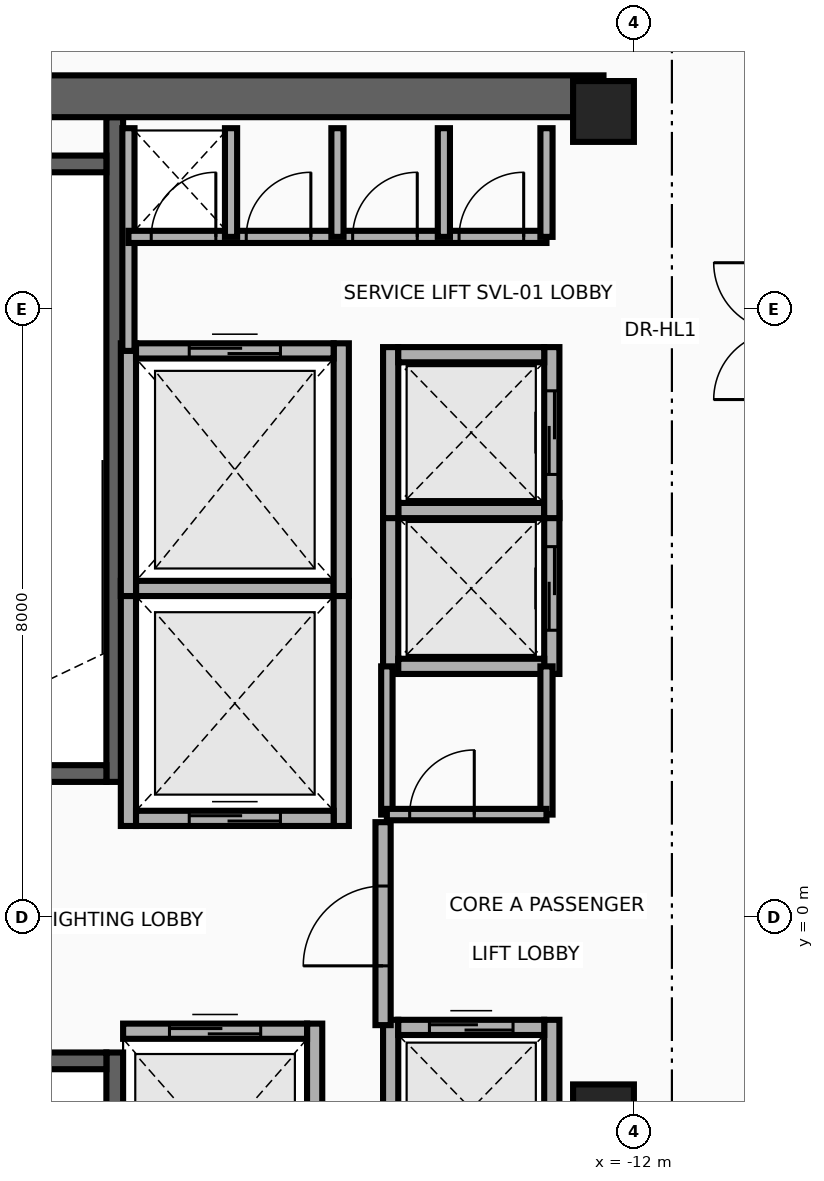
"""IFC4 building model, lengths in metres.
Left out: names, types, materials, properties, quantities, classifications, styles, units other than length and angle.
Written with IfcOpenShell. Run it as: python <this file> out.ifc"""

import sys

from ifc_helpers import new_model, si_unit, direction, frame, frame_2d, origin, origin_2d, place, context, subcontext, project, spatial, rectangle, extrude, source, transform, mapped, element, fill, save


model = new_model("IFC4")
c1 = context("Model", 3, precision=1e-05, world=origin(), true_north=direction((0.0, 1.0)))
c2 = subcontext(c1, "Body", "Model", "MODEL_VIEW")
j1 = project(units=[si_unit("LENGTHUNIT", "METRE"), si_unit("PLANEANGLEUNIT", "RADIAN")], contexts=[c1])
p1 = place(None, origin())
s1 = spatial("IfcSite", under=j1, at=p1, CompositionType="ELEMENT")
p2 = place(p1, origin())
s2 = spatial("IfcBuilding", under=s1, at=p2, CompositionType="ELEMENT")
p3 = place(p2, frame((0.0, 0.0, 273.0)))
s3 = spatial("IfcBuildingStorey", under=s2, at=p3, CompositionType="ELEMENT", Elevation=273.0)
p4 = place(p3, frame((-18.83, 1.78, 0.0), z_axis=(0.0, 0.0, 1.0), x_axis=(0.0, 1.0, 0.0)))
e1 = element("IfcWall", 1, at=p4, inside=s3, PredefinedType="SHEAR", context=c2, shape_type="SweptSolid", body=[
    extrude(rectangle(XDim=8.745, YDim=0.22, at=frame_2d((4.373, 0.0))), origin(), (0.0, 0.0, 1.0), 3.26),
])
p5 = place(p3, frame((-22.05, 1.89, 0.0), z_axis=(0.0, 0.0, 1.0), x_axis=(1.0, 0.0, 0.0)))
e2 = element("IfcWall", 2, at=p5, inside=s3, PredefinedType="SHEAR", context=c2, shape_type="SweptSolid", body=[
    extrude(rectangle(XDim=3.11, YDim=0.22, at=frame_2d((1.555, 0.0))), origin(), (0.0, 0.0, 1.0), 3.26),
])
p6 = place(p5, frame((1.0, 0.0, 0.0)))
e3 = element("IfcOpeningElement", 3, at=p6, cuts=e2, PredefinedType="OPENING", context=c2, shape_type="SweptSolid", body=[
    extrude(rectangle(XDim=1.1, YDim=2.15, at=frame_2d((0.55, 1.075))), frame((0.0, 0.125, 0.0), z_axis=(0.0, -1.0, 0.0), x_axis=(1.0, 0.0, 0.0)), (0.0, 0.0, 1.0), 0.25),
])
p7 = place(p3, frame((-22.05, 9.91, 0.0), z_axis=(0.0, 0.0, 1.0), x_axis=(1.0, 0.0, 0.0)))
e4 = element("IfcWall", 4, at=p7, inside=s3, PredefinedType="SHEAR", context=c2, shape_type="SweptSolid", body=[
    extrude(rectangle(XDim=3.11, YDim=0.22, at=frame_2d((1.555, 0.0))), origin(), (0.0, 0.0, 1.0), 3.26),
])
p8 = place(p3, frame((-18.83, -10.525, 0.0), z_axis=(0.0, 0.0, 1.0), x_axis=(0.0, 1.0, 0.0)))
e5 = element("IfcWall", 5, at=p8, inside=s3, PredefinedType="SHEAR", context=c2, shape_type="SweptSolid", body=[
    extrude(rectangle(XDim=8.745, YDim=0.22, at=frame_2d((4.373, 0.0))), origin(), (0.0, 0.0, 1.0), 3.26),
])
p9 = place(p3, frame((-22.05, -1.89, 0.0), z_axis=(0.0, 0.0, 1.0), x_axis=(1.0, 0.0, 0.0)))
e6 = element("IfcWall", 6, at=p9, inside=s3, PredefinedType="SHEAR", context=c2, shape_type="SweptSolid", body=[
    extrude(rectangle(XDim=3.11, YDim=0.22, at=frame_2d((1.555, 0.0))), origin(), (0.0, 0.0, 1.0), 3.26),
])
p10 = place(p9, frame((1.0, 0.0, 0.0)))
e7 = element("IfcOpeningElement", 7, at=p10, cuts=e6, PredefinedType="OPENING", context=c2, shape_type="SweptSolid", body=[
    extrude(rectangle(XDim=1.1, YDim=2.15, at=frame_2d((0.55, 1.075))), frame((0.0, 0.125, 0.0), z_axis=(0.0, -1.0, 0.0), x_axis=(1.0, 0.0, 0.0)), (0.0, 0.0, 1.0), 0.25),
])
p11 = place(p3, frame((-22.65, 10.8, 0.0), z_axis=(0.0, 0.0, 1.0), x_axis=(1.0, 0.0, 0.0)))
e8 = element("IfcWall", 8, at=p11, inside=s3, PredefinedType="SHEAR", context=c2, shape_type="SweptSolid", body=[
    extrude(rectangle(XDim=10.25, YDim=0.55, at=frame_2d((5.125, 0.0))), origin(), (0.0, 0.0, 1.0), 3.26),
])
m1 = source(origin(), c2, "Body", "SweptSolid", [
    extrude(rectangle(XDim=0.8, YDim=0.8, at=origin_2d()), origin(), (0.0, 0.0, 1.0), 3.5),
])
for number, where, z_axis, x_axis in (
    (9, (-12.4, -2.6, 0.0), (0.0, 0.0, 1.0), (1.0, 0.0, 0.0)),
    (10, (-12.4, 10.6, 0.0), (0.0, 0.0, 1.0), (1.0, 0.0, 0.0)),
):
    element("IfcColumn", number, at=place(p3, frame(where, z_axis=z_axis, x_axis=x_axis)), inside=s3, PredefinedType="COLUMN", context=c2, shape_type="MappedRepresentation", body=[
        mapped(m1, transform((0.0, 0.0, 0.0), x_axis=(1.0, 0.0, 0.0), y_axis=(0.0, 1.0, 0.0), z_axis=(0.0, 0.0, 1.0), scale=1.0)),
    ])
for number, where, z_axis, x_axis in (
    (11, (-18.65, 1.2, 0.0), (0.0, 0.0, 1.0), (0.0, 1.0, 0.0)),
    (12, (-15.85, 1.2, 0.0), (0.0, 0.0, 1.0), (0.0, 1.0, 0.0)),
):
    element("IfcWall", number, at=place(p3, frame(where, z_axis=z_axis, x_axis=x_axis)), inside=s3, PredefinedType="MOVABLE", context=c2, shape_type="SweptSolid", body=[
        extrude(rectangle(XDim=3.225, YDim=0.2, at=frame_2d((1.613, 0.0))), origin(), (0.0, 0.0, 1.0), 3.26),
    ])
p12 = place(p3, frame((-18.55, 1.3, 0.0), z_axis=(0.0, 0.0, 1.0), x_axis=(1.0, 0.0, 0.0)))
e13 = element("IfcWall", 13, at=p12, inside=s3, PredefinedType="MOVABLE", context=c2, shape_type="SweptSolid", body=[
    extrude(rectangle(XDim=2.6, YDim=0.2, at=frame_2d((1.3, 0.0))), origin(), (0.0, 0.0, 1.0), 3.26),
])
p13 = place(p12, frame((0.7, 0.0, 0.0)))
e14 = element("IfcOpeningElement", 14, at=p13, cuts=e13, PredefinedType="OPENING", context=c2, shape_type="SweptSolid", body=[
    extrude(rectangle(XDim=1.2, YDim=2.1, at=frame_2d((0.6, 1.05))), frame((0.0, 0.115, 0.0), z_axis=(0.0, -1.0, 0.0), x_axis=(1.0, 0.0, 0.0)), (0.0, 0.0, 1.0), 0.23),
])
p14 = place(p3, frame((-18.55, 4.325, 0.0), z_axis=(0.0, 0.0, 1.0), x_axis=(1.0, 0.0, 0.0)))
e15 = element("IfcWall", 15, at=p14, inside=s3, PredefinedType="MOVABLE", context=c2, shape_type="SweptSolid", body=[
    extrude(rectangle(XDim=2.6, YDim=0.2, at=frame_2d((1.3, 0.0))), origin(), (0.0, 0.0, 1.0), 3.26),
])
p15 = place(p3, frame((-16.2, -4.6, 0.0), z_axis=(0.0, 0.0, 1.0), x_axis=(0.0, 1.0, 0.0)))
e16 = element("IfcWall", 16, at=p15, inside=s3, PredefinedType="MOVABLE", context=c2, shape_type="SweptSolid", body=[
    extrude(rectangle(XDim=3.2, YDim=0.2, at=frame_2d((1.6, 0.0))), origin(), (0.0, 0.0, 1.0), 3.26),
])
p16 = place(p3, frame((-18.72, -1.5, 0.0), z_axis=(0.0, 0.0, 1.0), x_axis=(1.0, 0.0, 0.0)))
e17 = element("IfcWall", 17, at=p16, inside=s3, PredefinedType="MOVABLE", context=c2, shape_type="SweptSolid", body=[
    extrude(rectangle(XDim=2.42, YDim=0.2, at=frame_2d((1.21, 0.0))), origin(), (0.0, 0.0, 1.0), 3.26),
])
p17 = place(p16, frame((0.61, 0.0, 0.0)))
e18 = element("IfcOpeningElement", 18, at=p17, cuts=e17, PredefinedType="OPENING", context=c2, shape_type="SweptSolid", body=[
    extrude(rectangle(XDim=1.2, YDim=2.1, at=frame_2d((0.6, 1.05))), frame((0.0, 0.115, 0.0), z_axis=(0.0, -1.0, 0.0), x_axis=(1.0, 0.0, 0.0)), (0.0, 0.0, 1.0), 0.23),
])
for number, where, z_axis, x_axis in (
    (19, (-18.65, 4.225, 0.0), (0.0, 0.0, 1.0), (0.0, 1.0, 0.0)),
    (20, (-15.85, 4.225, 0.0), (0.0, 0.0, 1.0), (0.0, 1.0, 0.0)),
):
    element("IfcWall", number, at=place(p3, frame(where, z_axis=z_axis, x_axis=x_axis)), inside=s3, PredefinedType="MOVABLE", context=c2, shape_type="SweptSolid", body=[
        extrude(rectangle(XDim=3.325, YDim=0.2, at=frame_2d((1.663, 0.0))), origin(), (0.0, 0.0, 1.0), 3.26),
    ])
p18 = place(p3, frame((-18.55, 7.45, 0.0), z_axis=(0.0, 0.0, 1.0), x_axis=(1.0, 0.0, 0.0)))
e21 = element("IfcWall", 21, at=p18, inside=s3, PredefinedType="MOVABLE", context=c2, shape_type="SweptSolid", body=[
    extrude(rectangle(XDim=2.6, YDim=0.2, at=frame_2d((1.3, 0.0))), origin(), (0.0, 0.0, 1.0), 3.26),
])
p19 = place(p18, frame((0.7, 0.0, 0.0)))
e22 = element("IfcOpeningElement", 22, at=p19, cuts=e21, PredefinedType="OPENING", context=c2, shape_type="SweptSolid", body=[
    extrude(rectangle(XDim=1.2, YDim=2.1, at=frame_2d((0.6, 1.05))), frame((0.0, 0.115, 0.0), z_axis=(0.0, -1.0, 0.0), x_axis=(1.0, 0.0, 0.0)), (0.0, 0.0, 1.0), 0.23),
])
p20 = place(p3, frame((-15.2, 3.2, 0.0), z_axis=(0.0, 0.0, 1.0), x_axis=(0.0, 1.0, 0.0)))
e23 = element("IfcWall", 23, at=p20, inside=s3, PredefinedType="MOVABLE", context=c2, shape_type="SweptSolid", body=[
    extrude(rectangle(XDim=2.25, YDim=0.2, at=frame_2d((1.125, 0.0))), origin(), (0.0, 0.0, 1.0), 3.26),
])
p21 = place(p3, frame((-13.08, 3.2, 0.0), z_axis=(0.0, 0.0, 1.0), x_axis=(0.0, 1.0, 0.0)))
e24 = element("IfcWall", 24, at=p21, inside=s3, PredefinedType="MOVABLE", context=c2, shape_type="SweptSolid", body=[
    extrude(rectangle(XDim=2.25, YDim=0.2, at=frame_2d((1.125, 0.0))), origin(), (0.0, 0.0, 1.0), 3.26),
])
p22 = place(p21, frame((0.575, 0.0, 0.0)))
e25 = element("IfcOpeningElement", 25, at=p22, cuts=e24, PredefinedType="OPENING", context=c2, shape_type="SweptSolid", body=[
    extrude(rectangle(XDim=1.1, YDim=2.1, at=frame_2d((0.55, 1.05))), frame((0.0, 0.115, 0.0), z_axis=(0.0, -1.0, 0.0), x_axis=(1.0, 0.0, 0.0)), (0.0, 0.0, 1.0), 0.23),
])
for number, where, z_axis, x_axis in (
    (26, (-15.1, 3.3, 0.0), (0.0, 0.0, 1.0), (1.0, 0.0, 0.0)),
    (27, (-15.1, 5.35, 0.0), (0.0, 0.0, 1.0), (1.0, 0.0, 0.0)),
):
    element("IfcWall", number, at=place(p3, frame(where, z_axis=z_axis, x_axis=x_axis)), inside=s3, PredefinedType="MOVABLE", context=c2, shape_type="SweptSolid", body=[
        extrude(rectangle(XDim=1.92, YDim=0.2, at=frame_2d((0.96, 0.0))), origin(), (0.0, 0.0, 1.0), 3.26),
    ])
p23 = place(p3, frame((-15.2, 5.25, 0.0), z_axis=(0.0, 0.0, 1.0), x_axis=(0.0, 1.0, 0.0)))
e28 = element("IfcWall", 28, at=p23, inside=s3, PredefinedType="MOVABLE", context=c2, shape_type="SweptSolid", body=[
    extrude(rectangle(XDim=2.25, YDim=0.2, at=frame_2d((1.125, 0.0))), origin(), (0.0, 0.0, 1.0), 3.26),
])
p24 = place(p3, frame((-13.08, 5.25, 0.0), z_axis=(0.0, 0.0, 1.0), x_axis=(0.0, 1.0, 0.0)))
e29 = element("IfcWall", 29, at=p24, inside=s3, PredefinedType="MOVABLE", context=c2, shape_type="SweptSolid", body=[
    extrude(rectangle(XDim=2.25, YDim=0.2, at=frame_2d((1.125, 0.0))), origin(), (0.0, 0.0, 1.0), 3.26),
])
p25 = place(p24, frame((0.575, 0.0, 0.0)))
e30 = element("IfcOpeningElement", 30, at=p25, cuts=e29, PredefinedType="OPENING", context=c2, shape_type="SweptSolid", body=[
    extrude(rectangle(XDim=1.1, YDim=2.1, at=frame_2d((0.55, 1.05))), frame((0.0, 0.115, 0.0), z_axis=(0.0, -1.0, 0.0), x_axis=(1.0, 0.0, 0.0)), (0.0, 0.0, 1.0), 0.23),
])
p26 = place(p3, frame((-15.1, 7.4, 0.0), z_axis=(0.0, 0.0, 1.0), x_axis=(1.0, 0.0, 0.0)))
e31 = element("IfcWall", 31, at=p26, inside=s3, PredefinedType="MOVABLE", context=c2, shape_type="SweptSolid", body=[
    extrude(rectangle(XDim=1.92, YDim=0.2, at=frame_2d((0.96, 0.0))), origin(), (0.0, 0.0, 1.0), 3.26),
])
for number, where, z_axis, x_axis in (
    (32, (-15.2, -3.7, 0.0), (0.0, 0.0, 1.0), (0.0, 1.0, 0.0)),
    (33, (-13.08, -3.7, 0.0), (0.0, 0.0, 1.0), (0.0, 1.0, 0.0)),
):
    element("IfcWall", number, at=place(p3, frame(where, z_axis=z_axis, x_axis=x_axis)), inside=s3, PredefinedType="MOVABLE", context=c2, shape_type="SweptSolid", body=[
        extrude(rectangle(XDim=2.35, YDim=0.2, at=frame_2d((1.175, 0.0))), origin(), (0.0, 0.0, 1.0), 3.26),
    ])
p27 = place(p3, frame((-15.1, -1.45, 0.0), z_axis=(0.0, 0.0, 1.0), x_axis=(1.0, 0.0, 0.0)))
e34 = element("IfcWall", 34, at=p27, inside=s3, PredefinedType="MOVABLE", context=c2, shape_type="SweptSolid", body=[
    extrude(rectangle(XDim=1.92, YDim=0.2, at=frame_2d((0.96, 0.0))), origin(), (0.0, 0.0, 1.0), 3.26),
])
p28 = place(p27, frame((0.41, 0.0, 0.0)))
e35 = element("IfcOpeningElement", 35, at=p28, cuts=e34, PredefinedType="OPENING", context=c2, shape_type="SweptSolid", body=[
    extrude(rectangle(XDim=1.1, YDim=2.1, at=frame_2d((0.55, 1.05))), frame((0.0, 0.115, 0.0), z_axis=(0.0, -1.0, 0.0), x_axis=(1.0, 0.0, 0.0)), (0.0, 0.0, 1.0), 0.23),
])
p29 = place(p3, frame((-15.3, -1.42, 0.0), z_axis=(0.0, 0.0, 1.0), x_axis=(0.0, 1.0, 0.0)))
e36 = element("IfcWall", 36, at=p29, inside=s3, PredefinedType="PARTITIONING", context=c2, shape_type="SweptSolid", body=[
    extrude(rectangle(XDim=2.67, YDim=0.2, at=frame_2d((1.335, 0.0))), origin(), (0.0, 0.0, 1.0), 3.26),
])
p30 = place(p29, frame((0.78, 0.0, 0.0)))
e37 = element("IfcOpeningElement", 37, at=p30, cuts=e36, PredefinedType="OPENING", context=c2, shape_type="SweptSolid", body=[
    extrude(rectangle(XDim=1.05, YDim=2.15, at=frame_2d((0.525, 1.075))), frame((0.0, 0.115, 0.0), z_axis=(0.0, -1.0, 0.0), x_axis=(1.0, 0.0, 0.0)), (0.0, 0.0, 1.0), 0.23),
])
p31 = place(p3, frame((-18.65, 7.45, 0.0), z_axis=(0.0, 0.0, 1.0), x_axis=(0.0, 1.0, 0.0)))
e38 = element("IfcWall", 38, at=p31, inside=s3, PredefinedType="PARTITIONING", context=c2, shape_type="SweptSolid", body=[
    extrude(rectangle(XDim=2.93, YDim=0.16, at=frame_2d((1.465, 0.0))), origin(), (0.0, 0.0, 1.0), 3.26),
])
p32 = place(p3, frame((-18.65, 8.95, 0.0), z_axis=(0.0, 0.0, 1.0), x_axis=(1.0, 0.0, 0.0)))
e39 = element("IfcWall", 39, at=p32, inside=s3, PredefinedType="PARTITIONING", context=c2, shape_type="SweptSolid", body=[
    extrude(rectangle(XDim=5.5, YDim=0.16, at=frame_2d((2.75, 0.0))), origin(), (0.0, 0.0, 1.0), 3.26),
])
p33 = place(p32, frame((0.3, 0.0, 0.0)))
e40 = element("IfcOpeningElement", 40, at=p33, cuts=e39, PredefinedType="OPENING", context=c2, shape_type="SweptSolid", body=[
    extrude(rectangle(XDim=0.85, YDim=2.05, at=frame_2d((0.425, 1.025))), frame((0.0, 0.095, 0.0), z_axis=(0.0, -1.0, 0.0), x_axis=(1.0, 0.0, 0.0)), (0.0, 0.0, 1.0), 0.19),
])
p34 = place(p32, frame((1.55, 0.0, 0.0)))
e41 = element("IfcOpeningElement", 41, at=p34, cuts=e39, PredefinedType="OPENING", context=c2, shape_type="SweptSolid", body=[
    extrude(rectangle(XDim=0.85, YDim=2.05, at=frame_2d((0.425, 1.025))), frame((0.0, 0.095, 0.0), z_axis=(0.0, -1.0, 0.0), x_axis=(1.0, 0.0, 0.0)), (0.0, 0.0, 1.0), 0.19),
])
p35 = place(p32, frame((2.95, 0.0, 0.0)))
e42 = element("IfcOpeningElement", 42, at=p35, cuts=e39, PredefinedType="OPENING", context=c2, shape_type="SweptSolid", body=[
    extrude(rectangle(XDim=0.85, YDim=2.05, at=frame_2d((0.425, 1.025))), frame((0.0, 0.095, 0.0), z_axis=(0.0, -1.0, 0.0), x_axis=(1.0, 0.0, 0.0)), (0.0, 0.0, 1.0), 0.19),
])
p36 = place(p32, frame((4.35, 0.0, 0.0)))
e43 = element("IfcOpeningElement", 43, at=p36, cuts=e39, PredefinedType="OPENING", context=c2, shape_type="SweptSolid", body=[
    extrude(rectangle(XDim=0.85, YDim=2.05, at=frame_2d((0.425, 1.025))), frame((0.0, 0.095, 0.0), z_axis=(0.0, -1.0, 0.0), x_axis=(1.0, 0.0, 0.0)), (0.0, 0.0, 1.0), 0.19),
])
for number, where, z_axis, x_axis in (
    (44, (-13.15, 8.95, 0.0), (0.0, 0.0, 1.0), (0.0, 1.0, 0.0)),
    (45, (-17.3, 8.95, 0.0), (0.0, 0.0, 1.0), (0.0, 1.0, 0.0)),
    (46, (-15.9, 8.95, 0.0), (0.0, 0.0, 1.0), (0.0, 1.0, 0.0)),
    (47, (-14.5, 8.95, 0.0), (0.0, 0.0, 1.0), (0.0, 1.0, 0.0)),
):
    element("IfcWall", number, at=place(p3, frame(where, z_axis=z_axis, x_axis=x_axis)), inside=s3, PredefinedType="PARTITIONING", context=c2, shape_type="SweptSolid", body=[
        extrude(rectangle(XDim=1.43, YDim=0.16, at=frame_2d((0.715, 0.0))), origin(), (0.0, 0.0, 1.0), 3.26),
    ])
p37 = place(p3, frame((-13.15, 1.35, 0.0), z_axis=(0.0, 0.0, 1.0), x_axis=(0.0, 1.0, 0.0)))
e48 = element("IfcWall", 48, at=p37, inside=s3, PredefinedType="PARTITIONING", context=c2, shape_type="SweptSolid", body=[
    extrude(rectangle(XDim=1.95, YDim=0.16, at=frame_2d((0.975, 0.0))), origin(), (0.0, 0.0, 1.0), 3.26),
])
p38 = place(p3, frame((-15.25, 1.35, 0.0), z_axis=(0.0, 0.0, 1.0), x_axis=(0.0, 1.0, 0.0)))
e49 = element("IfcWall", 49, at=p38, inside=s3, PredefinedType="PARTITIONING", context=c2, shape_type="SweptSolid", body=[
    extrude(rectangle(XDim=1.95, YDim=0.15, at=frame_2d((0.975, 0.0))), origin(), (0.0, 0.0, 1.0), 3.26),
])
p39 = place(p3, frame((-15.25, 1.35, 0.0), z_axis=(0.0, 0.0, 1.0), x_axis=(1.0, 0.0, 0.0)))
e50 = element("IfcWall", 50, at=p39, inside=s3, PredefinedType="PARTITIONING", context=c2, shape_type="SweptSolid", body=[
    extrude(rectangle(XDim=2.1, YDim=0.15, at=frame_2d((1.05, 0.0))), origin(), (0.0, 0.0, 1.0), 3.26),
])
p40 = place(p39, frame((0.3, 0.0, 0.0)))
e51 = element("IfcOpeningElement", 51, at=p40, cuts=e50, PredefinedType="OPENING", context=c2, shape_type="SweptSolid", body=[
    extrude(rectangle(XDim=0.85, YDim=2.05, at=frame_2d((0.425, 1.025))), frame((0.0, 0.09, 0.0), z_axis=(0.0, -1.0, 0.0), x_axis=(1.0, 0.0, 0.0)), (0.0, 0.0, 1.0), 0.18),
])
p41 = place(p13, origin())
e52 = element("IfcDoor", 52, at=p41, inside=s3, OperationType="DOUBLE_DOOR_SLIDING", PredefinedType="DOOR", context=c2, shape_type="SweptSolid", body=[
    extrude(rectangle(XDim=1.2, YDim=2.1, at=frame_2d((0.6, 1.05))), frame((0.0, 0.025, 0.0), z_axis=(0.0, -1.0, 0.0), x_axis=(1.0, 0.0, 0.0)), (0.0, 0.0, 1.0), 0.05),
])
fill(e14, e52)
p42 = place(p17, origin())
e53 = element("IfcDoor", 53, at=p42, inside=s3, OperationType="DOUBLE_DOOR_SLIDING", PredefinedType="DOOR", context=c2, shape_type="SweptSolid", body=[
    extrude(rectangle(XDim=1.2, YDim=2.1, at=frame_2d((0.6, 1.05))), frame((0.0, 0.025, 0.0), z_axis=(0.0, -1.0, 0.0), x_axis=(1.0, 0.0, 0.0)), (0.0, 0.0, 1.0), 0.05),
])
fill(e18, e53)
p43 = place(p19, origin())
e54 = element("IfcDoor", 54, at=p43, inside=s3, OperationType="DOUBLE_DOOR_SLIDING", PredefinedType="DOOR", context=c2, shape_type="SweptSolid", body=[
    extrude(rectangle(XDim=1.2, YDim=2.1, at=frame_2d((0.6, 1.05))), frame((0.0, 0.025, 0.0), z_axis=(0.0, -1.0, 0.0), x_axis=(1.0, 0.0, 0.0)), (0.0, 0.0, 1.0), 0.05),
])
fill(e22, e54)
p44 = place(p22, origin())
e55 = element("IfcDoor", 55, at=p44, inside=s3, OperationType="DOUBLE_DOOR_SLIDING", PredefinedType="DOOR", context=c2, shape_type="SweptSolid", body=[
    extrude(rectangle(XDim=1.1, YDim=2.1, at=frame_2d((0.55, 1.05))), frame((0.0, 0.025, 0.0), z_axis=(0.0, -1.0, 0.0), x_axis=(1.0, 0.0, 0.0)), (0.0, 0.0, 1.0), 0.05),
])
fill(e25, e55)
p45 = place(p25, origin())
e56 = element("IfcDoor", 56, at=p45, inside=s3, OperationType="DOUBLE_DOOR_SLIDING", PredefinedType="DOOR", context=c2, shape_type="SweptSolid", body=[
    extrude(rectangle(XDim=1.1, YDim=2.1, at=frame_2d((0.55, 1.05))), frame((0.0, 0.025, 0.0), z_axis=(0.0, -1.0, 0.0), x_axis=(1.0, 0.0, 0.0)), (0.0, 0.0, 1.0), 0.05),
])
fill(e30, e56)
p46 = place(p28, origin())
e57 = element("IfcDoor", 57, at=p46, inside=s3, OperationType="DOUBLE_DOOR_SLIDING", PredefinedType="DOOR", context=c2, shape_type="SweptSolid", body=[
    extrude(rectangle(XDim=1.1, YDim=2.1, at=frame_2d((0.55, 1.05))), frame((0.0, 0.025, 0.0), z_axis=(0.0, -1.0, 0.0), x_axis=(1.0, 0.0, 0.0)), (0.0, 0.0, 1.0), 0.05),
])
fill(e35, e57)
p47 = place(p30, origin())
e58 = element("IfcDoor", 58, at=p47, inside=s3, OperationType="SINGLE_SWING_RIGHT", PredefinedType="DOOR", context=c2, shape_type="SweptSolid", body=[
    extrude(rectangle(XDim=1.05, YDim=2.15, at=frame_2d((0.525, 1.075))), frame((0.0, 0.025, 0.0), z_axis=(0.0, -1.0, 0.0), x_axis=(1.0, 0.0, 0.0)), (0.0, 0.0, 1.0), 0.05),
])
fill(e37, e58)
p48 = place(p33, origin())
e59 = element("IfcDoor", 59, at=p48, inside=s3, OperationType="SINGLE_SWING_LEFT", PredefinedType="DOOR", context=c2, shape_type="SweptSolid", body=[
    extrude(rectangle(XDim=0.85, YDim=2.05, at=frame_2d((0.425, 1.025))), frame((0.0, 0.025, 0.0), z_axis=(0.0, -1.0, 0.0), x_axis=(1.0, 0.0, 0.0)), (0.0, 0.0, 1.0), 0.05),
])
fill(e40, e59)
p49 = place(p34, origin())
e60 = element("IfcDoor", 60, at=p49, inside=s3, OperationType="SINGLE_SWING_RIGHT", PredefinedType="DOOR", context=c2, shape_type="SweptSolid", body=[
    extrude(rectangle(XDim=0.85, YDim=2.05, at=frame_2d((0.425, 1.025))), frame((0.0, 0.025, 0.0), z_axis=(0.0, -1.0, 0.0), x_axis=(1.0, 0.0, 0.0)), (0.0, 0.0, 1.0), 0.05),
])
fill(e41, e60)
p50 = place(p35, origin())
e61 = element("IfcDoor", 61, at=p50, inside=s3, OperationType="SINGLE_SWING_LEFT", PredefinedType="DOOR", context=c2, shape_type="SweptSolid", body=[
    extrude(rectangle(XDim=0.85, YDim=2.05, at=frame_2d((0.425, 1.025))), frame((0.0, 0.025, 0.0), z_axis=(0.0, -1.0, 0.0), x_axis=(1.0, 0.0, 0.0)), (0.0, 0.0, 1.0), 0.05),
])
fill(e42, e61)
p51 = place(p36, origin())
e62 = element("IfcDoor", 62, at=p51, inside=s3, OperationType="SINGLE_SWING_RIGHT", PredefinedType="DOOR", context=c2, shape_type="SweptSolid", body=[
    extrude(rectangle(XDim=0.85, YDim=2.05, at=frame_2d((0.425, 1.025))), frame((0.0, 0.025, 0.0), z_axis=(0.0, -1.0, 0.0), x_axis=(1.0, 0.0, 0.0)), (0.0, 0.0, 1.0), 0.05),
])
fill(e43, e62)
p52 = place(p40, origin())
e63 = element("IfcDoor", 63, at=p52, inside=s3, OperationType="SINGLE_SWING_RIGHT", PredefinedType="DOOR", context=c2, shape_type="SweptSolid", body=[
    extrude(rectangle(XDim=0.85, YDim=2.05, at=frame_2d((0.425, 1.025))), frame((0.0, 0.025, 0.0), z_axis=(0.0, -1.0, 0.0), x_axis=(1.0, 0.0, 0.0)), (0.0, 0.0, 1.0), 0.05),
])
fill(e51, e63)
save(model, sys.argv[1])
